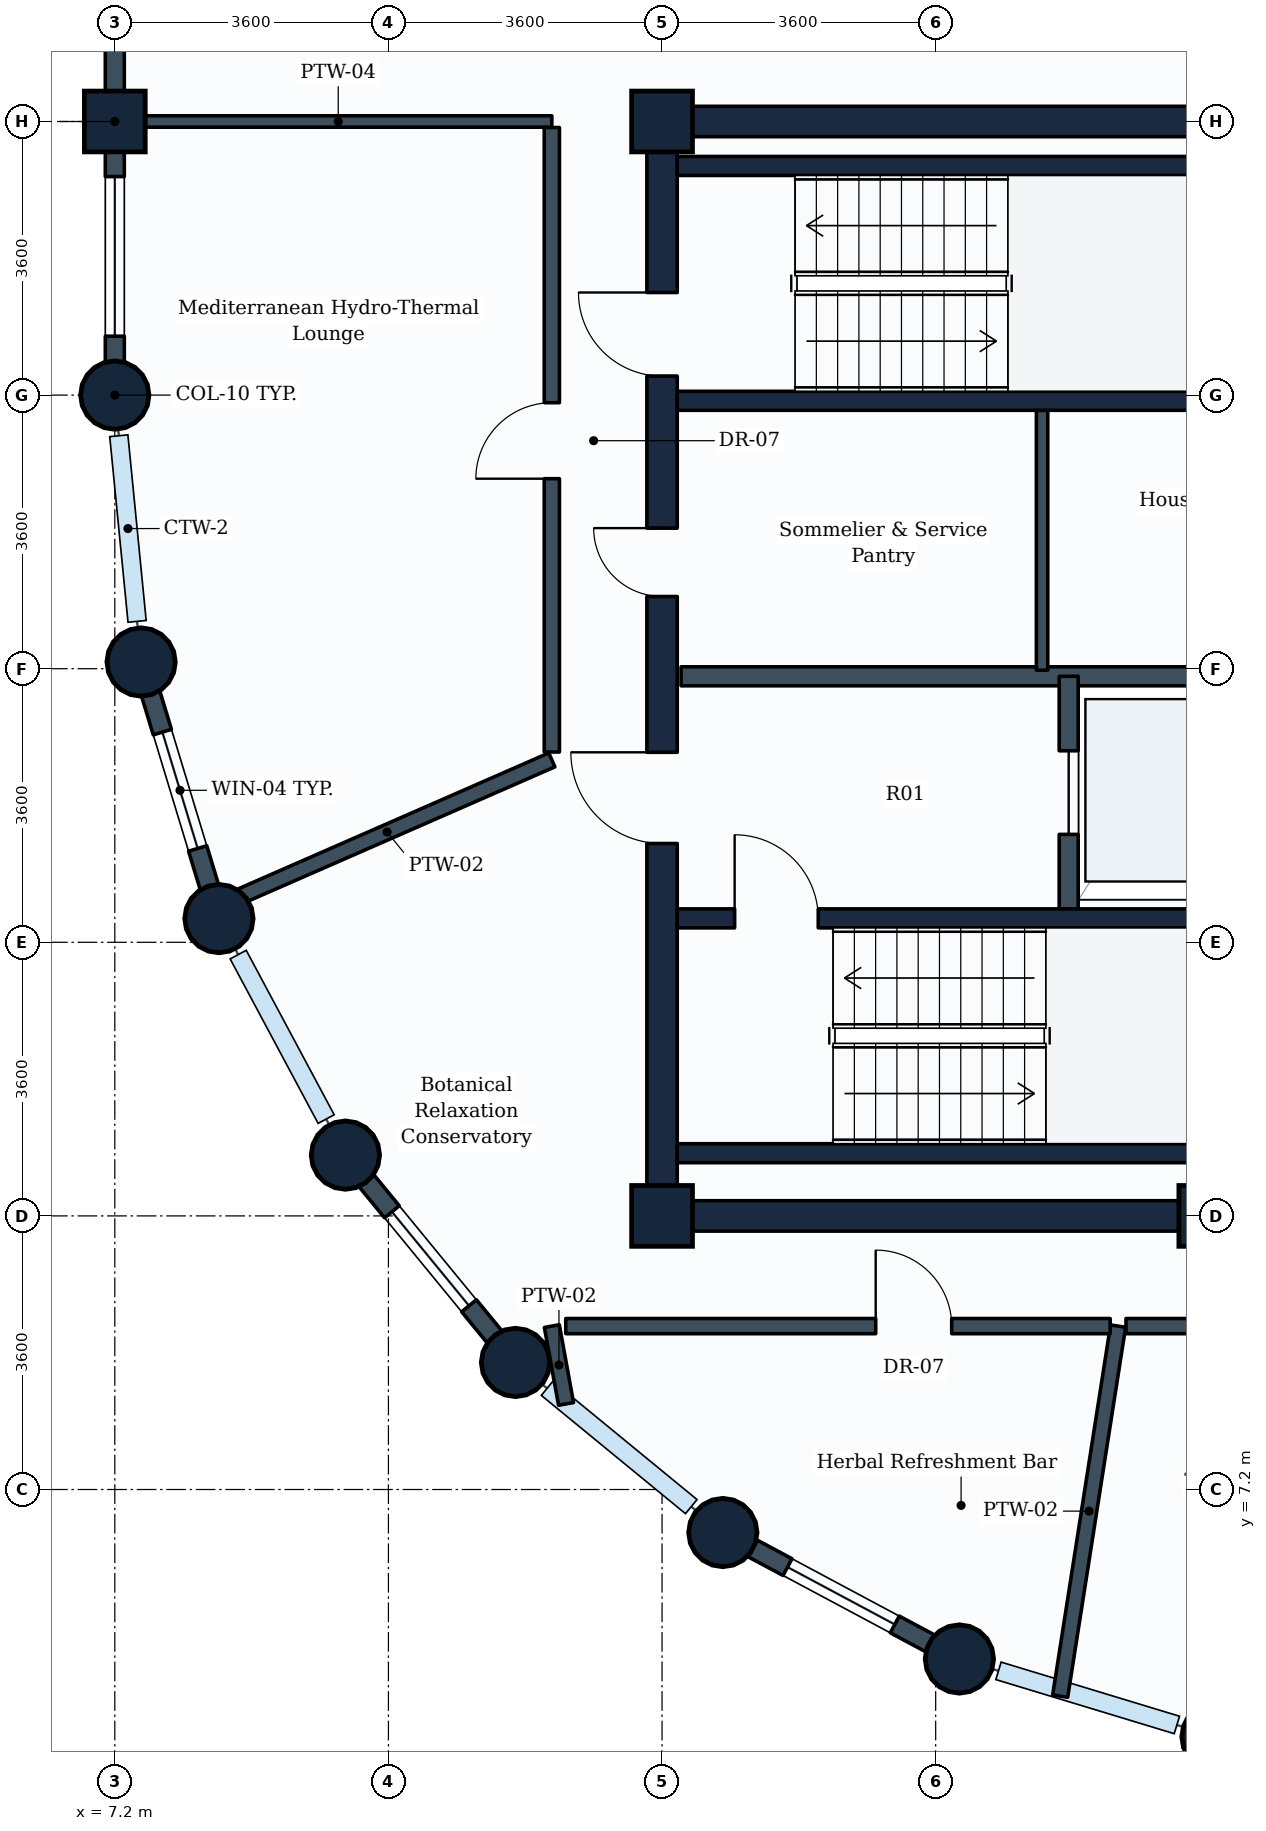
"""IFC4 building model, lengths in metres.
Left out: names, types, materials, properties, quantities, classifications, styles, units other than length and angle.
Written with IfcOpenShell. Run it as: python <this file> out.ifc"""

import sys

from ifc_helpers import new_model, si_unit, direction, frame, frame_2d, origin, origin_2d, place, context, subcontext, project, spatial, rectangle, circle, extrude, element, fill, save


model = new_model("IFC4")
c1 = context("Model", 3, precision=1e-05, world=origin(), true_north=direction((0.0, 1.0)))
c2 = subcontext(c1, "Body", "Model", "MODEL_VIEW")
j1 = project(units=[si_unit("LENGTHUNIT", "METRE"), si_unit("PLANEANGLEUNIT", "RADIAN")], contexts=[c1])
p1 = place(None, origin())
s1 = spatial("IfcSite", under=j1, at=p1, CompositionType="ELEMENT")
p2 = place(p1, origin())
s2 = spatial("IfcBuilding", under=s1, at=p2, CompositionType="ELEMENT")
p3 = place(p2, frame((0.0, 0.0, 239.0)))
s3 = spatial("IfcBuildingStorey", under=s2, at=p3, CompositionType="ELEMENT", Elevation=239.0)
p4 = place(p3, frame((7.2, 21.6, 0.0), z_axis=(0.0, 0.0, 1.0), x_axis=(1.0, 0.0, 0.0)))
e1 = element("IfcColumn", 1, at=p4, inside=s3, PredefinedType="COLUMN", context=c2, shape_type="SweptSolid", body=[
    extrude(circle(Radius=0.45, at=origin_2d()), origin(), (0.0, 0.0, 1.0), 3.6),
])
p5 = place(p3, frame((7.2, 25.2, 0.0), z_axis=(0.0, 0.0, 1.0), x_axis=(0.0, 1.0, 0.0)))
e2 = element("IfcColumn", 2, at=p5, inside=s3, PredefinedType="COLUMN", context=c2, shape_type="SweptSolid", body=[
    extrude(rectangle(XDim=0.8, YDim=0.8, at=origin_2d()), origin(), (0.0, 0.0, 1.0), 3.6),
])
for number, where, z_axis, x_axis in (
    (3, (7.546, 18.088, 0.0), (0.0, 0.0, 1.0), (1.0, 0.0, 0.0)),
    (4, (8.57, 14.712, 0.0), (0.0, 0.0, 1.0), (1.0, 0.0, 0.0)),
    (5, (10.234, 11.6, 0.0), (0.0, 0.0, 1.0), (1.0, 0.0, 0.0)),
    (6, (12.472, 8.872, 0.0), (0.0, 0.0, 1.0), (1.0, 0.0, 0.0)),
):
    element("IfcColumn", number, at=place(p3, frame(where, z_axis=z_axis, x_axis=x_axis)), inside=s3, PredefinedType="COLUMN", context=c2, shape_type="SweptSolid", body=[
        extrude(circle(Radius=0.45, at=origin_2d()), origin(), (0.0, 0.0, 1.0), 3.6),
    ])
for number, where, z_axis, x_axis in (
    (7, (14.4, 10.8, 0.0), (0.0, 0.0, 1.0), (1.0, 0.0, 0.0)),
    (8, (14.4, 25.2, 0.0), (0.0, 0.0, 1.0), (1.0, 0.0, 0.0)),
):
    element("IfcColumn", number, at=place(p3, frame(where, z_axis=z_axis, x_axis=x_axis)), inside=s3, PredefinedType="COLUMN", context=c2, shape_type="SweptSolid", body=[
        extrude(rectangle(XDim=0.8, YDim=0.8, at=origin_2d()), origin(), (0.0, 0.0, 1.0), 3.6),
    ])
for number, where, z_axis, x_axis in (
    (9, (15.2, 6.634, 0.0), (0.0, 0.0, 1.0), (1.0, 0.0, 0.0)),
    (10, (18.312, 4.97, 0.0), (0.0, 0.0, 1.0), (1.0, 0.0, 0.0)),
):
    element("IfcColumn", number, at=place(p3, frame(where, z_axis=z_axis, x_axis=x_axis)), inside=s3, PredefinedType="COLUMN", context=c2, shape_type="SweptSolid", body=[
        extrude(circle(Radius=0.45, at=origin_2d()), origin(), (0.0, 0.0, 1.0), 3.6),
    ])
p6 = place(p3, frame((21.6, 10.8, 0.0), z_axis=(0.0, 0.0, 1.0), x_axis=(1.0, 0.0, 0.0)))
e11 = element("IfcColumn", 11, at=p6, inside=s3, PredefinedType="COLUMN", context=c2, shape_type="SweptSolid", body=[
    extrude(rectangle(XDim=0.8, YDim=0.8, at=origin_2d()), origin(), (0.0, 0.0, 1.0), 3.6),
])
p7 = place(p3, frame((21.688, 3.946, 0.0), z_axis=(0.0, 0.0, 1.0), x_axis=(1.0, 0.0, 0.0)))
e12 = element("IfcColumn", 12, at=p7, inside=s3, PredefinedType="COLUMN", context=c2, shape_type="SweptSolid", body=[
    extrude(circle(Radius=0.45, at=origin_2d()), origin(), (0.0, 0.0, 1.0), 3.6),
])
p8 = place(p3, frame((7.2, 25.2, 0.0), z_axis=(0.0, 0.0, 1.0), x_axis=(0.0, 1.0, 0.0)))
e13 = element("IfcWall", 13, at=p8, inside=s3, PredefinedType="STANDARD", context=c2, shape_type="SweptSolid", body=[
    extrude(rectangle(XDim=3.6, YDim=0.25, at=frame_2d((1.8, 0.0))), origin(), (0.0, 0.0, 1.0), 2.83),
])
p9 = place(p3, frame((7.2, 21.6, 0.0), z_axis=(0.0, 0.0, 1.0), x_axis=(0.0, 1.0, 0.0)))
e14 = element("IfcWall", 14, at=p9, inside=s3, PredefinedType="STANDARD", context=c2, shape_type="SweptSolid", body=[
    extrude(rectangle(XDim=3.6, YDim=0.25, at=frame_2d((1.8, 0.0))), origin(), (0.0, 0.0, 1.0), 2.83),
])
p10 = place(p9, frame((0.775, 0.0, 0.85)))
e15 = element("IfcOpeningElement", 15, at=p10, cuts=e14, PredefinedType="OPENING", context=c2, shape_type="SweptSolid", body=[
    extrude(rectangle(XDim=2.1, YDim=1.35, at=frame_2d((1.05, 0.675))), frame((0.0, 0.135, 0.0), z_axis=(0.0, -1.0, 0.0), x_axis=(1.0, 0.0, 0.0)), (0.0, 0.0, 1.0), 0.27),
])
p11 = place(p3, frame((8.57, 14.712, 0.0), z_axis=(0.0, 0.0, 1.0), x_axis=(-0.290305086481, 0.956934144423, 0.0)))
e16 = element("IfcWall", 16, at=p11, inside=s3, PredefinedType="STANDARD", context=c2, shape_type="SweptSolid", body=[
    extrude(rectangle(XDim=3.528, YDim=0.25, at=frame_2d((1.764, 0.0))), origin(), (0.0, 0.0, 1.0), 2.83),
])
p12 = place(p11, frame((0.964, 0.0, 0.85)))
e17 = element("IfcOpeningElement", 17, at=p12, cuts=e16, PredefinedType="OPENING", context=c2, shape_type="SweptSolid", body=[
    extrude(rectangle(XDim=1.6, YDim=1.35, at=frame_2d((0.8, 0.675))), frame((0.0, 0.135, 0.0), z_axis=(0.0, -1.0, 0.0), x_axis=(1.0, 0.0, 0.0)), (0.0, 0.0, 1.0), 0.27),
])
p13 = place(p3, frame((12.472, 8.872, 0.0), z_axis=(0.0, 0.0, 1.0), x_axis=(-0.634258295121, 0.773121216285, 0.0)))
e18 = element("IfcWall", 18, at=p13, inside=s3, PredefinedType="STANDARD", context=c2, shape_type="SweptSolid", body=[
    extrude(rectangle(XDim=3.529, YDim=0.25, at=frame_2d((1.764, 0.0))), origin(), (0.0, 0.0, 1.0), 2.83),
])
p14 = place(p13, frame((0.964, 0.0, 0.85)))
e19 = element("IfcOpeningElement", 19, at=p14, cuts=e18, PredefinedType="OPENING", context=c2, shape_type="SweptSolid", body=[
    extrude(rectangle(XDim=1.6, YDim=1.35, at=frame_2d((0.8, 0.675))), frame((0.0, 0.135, 0.0), z_axis=(0.0, -1.0, 0.0), x_axis=(1.0, 0.0, 0.0)), (0.0, 0.0, 1.0), 0.27),
])
p15 = place(p3, frame((18.312, 4.97, 0.0), z_axis=(0.0, 0.0, 1.0), x_axis=(-0.881846862014, 0.471535907389, 0.0)))
e20 = element("IfcWall", 20, at=p15, inside=s3, PredefinedType="STANDARD", context=c2, shape_type="SweptSolid", body=[
    extrude(rectangle(XDim=3.529, YDim=0.25, at=frame_2d((1.765, 0.0))), origin(), (0.0, 0.0, 1.0), 2.83),
])
p16 = place(p15, frame((0.964, 0.0, 0.85)))
e21 = element("IfcOpeningElement", 21, at=p16, cuts=e20, PredefinedType="OPENING", context=c2, shape_type="SweptSolid", body=[
    extrude(rectangle(XDim=1.6, YDim=1.35, at=frame_2d((0.8, 0.675))), frame((0.0, 0.135, 0.0), z_axis=(0.0, -1.0, 0.0), x_axis=(1.0, 0.0, 0.0)), (0.0, 0.0, 1.0), 0.27),
])
p17 = place(p3, frame((14.4, 10.8, 0.0), z_axis=(0.0, 0.0, 1.0), x_axis=(1.0, 0.0, 0.0)))
e22 = element("IfcWall", 22, at=p17, inside=s3, PredefinedType="SHEAR", context=c2, shape_type="SweptSolid", body=[
    extrude(rectangle(XDim=18.0, YDim=0.4, at=frame_2d((9.0, 0.0))), origin(), (0.0, 0.0, 1.0), 3.35),
])
p18 = place(p3, frame((14.4, 25.2, 0.0), z_axis=(0.0, 0.0, 1.0), x_axis=(1.0, 0.0, 0.0)))
e23 = element("IfcWall", 23, at=p18, inside=s3, PredefinedType="SHEAR", context=c2, shape_type="SweptSolid", body=[
    extrude(rectangle(XDim=10.8, YDim=0.4, at=frame_2d((5.4, 0.0))), origin(), (0.0, 0.0, 1.0), 3.35),
])
p19 = place(p3, frame((14.4, 10.8, 0.0), z_axis=(0.0, 0.0, 1.0), x_axis=(0.0, 1.0, 0.0)))
e24 = element("IfcWall", 24, at=p19, inside=s3, PredefinedType="SHEAR", context=c2, shape_type="SweptSolid", body=[
    extrude(rectangle(XDim=14.4, YDim=0.4, at=frame_2d((7.2, 0.0))), origin(), (0.0, 0.0, 1.0), 3.35),
])
p20 = place(p19, frame((11.05, 0.0, 0.0)))
e25 = element("IfcOpeningElement", 25, at=p20, cuts=e24, PredefinedType="OPENING", context=c2, shape_type="SweptSolid", body=[
    extrude(rectangle(XDim=1.1, YDim=2.1, at=frame_2d((0.55, 1.05))), frame((0.0, 0.21, 0.0), z_axis=(0.0, -1.0, 0.0), x_axis=(1.0, 0.0, 0.0)), (0.0, 0.0, 1.0), 0.42),
])
p21 = place(p19, frame((4.9, 0.0, 0.0)))
e26 = element("IfcOpeningElement", 26, at=p21, cuts=e24, PredefinedType="OPENING", context=c2, shape_type="SweptSolid", body=[
    extrude(rectangle(XDim=1.2, YDim=2.1, at=frame_2d((0.6, 1.05))), frame((0.0, 0.21, 0.0), z_axis=(0.0, -1.0, 0.0), x_axis=(1.0, 0.0, 0.0)), (0.0, 0.0, 1.0), 0.42),
])
p22 = place(p19, frame((8.15, 0.0, 0.0)))
e27 = element("IfcOpeningElement", 27, at=p22, cuts=e24, PredefinedType="OPENING", context=c2, shape_type="SweptSolid", body=[
    extrude(rectangle(XDim=0.9, YDim=2.1, at=frame_2d((0.45, 1.05))), frame((0.0, 0.21, 0.0), z_axis=(0.0, -1.0, 0.0), x_axis=(1.0, 0.0, 0.0)), (0.0, 0.0, 1.0), 0.42),
])
p23 = place(p3, frame((14.6, 11.625, 0.0), z_axis=(0.0, 0.0, 1.0), x_axis=(1.0, 0.0, 0.0)))
e28 = element("IfcWall", 28, at=p23, inside=s3, PredefinedType="SHEAR", context=c2, shape_type="SweptSolid", body=[
    extrude(rectangle(XDim=8.75, YDim=0.25, at=frame_2d((4.375, 0.0))), origin(), (0.0, 0.0, 1.0), 3.35),
])
p24 = place(p3, frame((14.6, 14.715, 0.0), z_axis=(0.0, 0.0, 1.0), x_axis=(1.0, 0.0, 0.0)))
e29 = element("IfcWall", 29, at=p24, inside=s3, PredefinedType="SHEAR", context=c2, shape_type="SweptSolid", body=[
    extrude(rectangle(XDim=8.75, YDim=0.25, at=frame_2d((4.375, 0.0))), origin(), (0.0, 0.0, 1.0), 3.35),
])
p25 = place(p24, frame((0.755, 0.0, 0.0)))
e30 = element("IfcOpeningElement", 30, at=p25, cuts=e29, PredefinedType="OPENING", context=c2, shape_type="SweptSolid", body=[
    extrude(rectangle(XDim=1.1, YDim=2.1, at=frame_2d((0.55, 1.05))), frame((0.0, 0.135, 0.0), z_axis=(0.0, -1.0, 0.0), x_axis=(1.0, 0.0, 0.0)), (0.0, 0.0, 1.0), 0.27),
])
for number, where, z_axis, x_axis in (
    (31, (14.6, 21.525, 0.0), (0.0, 0.0, 1.0), (1.0, 0.0, 0.0)),
    (32, (14.6, 24.615, 0.0), (0.0, 0.0, 1.0), (1.0, 0.0, 0.0)),
):
    element("IfcWall", number, at=place(p3, frame(where, z_axis=z_axis, x_axis=x_axis)), inside=s3, PredefinedType="SHEAR", context=c2, shape_type="SweptSolid", body=[
        extrude(rectangle(XDim=8.3, YDim=0.25, at=frame_2d((4.15, 0.0))), origin(), (0.0, 0.0, 1.0), 3.35),
    ])
p26 = place(p3, frame((14.65, 17.9, 0.0), z_axis=(0.0, 0.0, 1.0), x_axis=(1.0, 0.0, 0.0)))
e33 = element("IfcWall", 33, at=p26, inside=s3, PredefinedType="PARTITIONING", context=c2, shape_type="SweptSolid", body=[
    extrude(rectangle(XDim=7.15, YDim=0.25, at=frame_2d((3.575, 0.0))), origin(), (0.0, 0.0, 1.0), 3.335),
])
p27 = place(p3, frame((19.75, 14.84, 0.0), z_axis=(0.0, 0.0, 1.0), x_axis=(0.0, 1.0, 0.0)))
e34 = element("IfcWall", 34, at=p27, inside=s3, PredefinedType="PARTITIONING", context=c2, shape_type="SweptSolid", body=[
    extrude(rectangle(XDim=3.06, YDim=0.25, at=frame_2d((1.53, 0.0))), origin(), (0.0, 0.0, 1.0), 3.335),
])
p28 = place(p27, frame((0.98, 0.0, 0.0)))
e35 = element("IfcOpeningElement", 35, at=p28, cuts=e34, PredefinedType="OPENING", context=c2, shape_type="SweptSolid", body=[
    extrude(rectangle(XDim=1.1, YDim=2.1, at=frame_2d((0.55, 1.05))), frame((0.0, 0.135, 0.0), z_axis=(0.0, -1.0, 0.0), x_axis=(1.0, 0.0, 0.0)), (0.0, 0.0, 1.0), 0.27),
])
p29 = place(p3, frame((19.4, 17.98, 0.0), z_axis=(0.0, 0.0, 1.0), x_axis=(0.0, 1.0, 0.0)))
e36 = element("IfcWall", 36, at=p29, inside=s3, PredefinedType="PARTITIONING", context=c2, shape_type="SweptSolid", body=[
    extrude(rectangle(XDim=3.42, YDim=0.15, at=frame_2d((1.71, 0.0))), origin(), (0.0, 0.0, 1.0), 3.335),
])
p30 = place(p3, frame((7.329, 25.2, 0.0), z_axis=(0.0, 0.0, 1.0), x_axis=(1.0, 0.0, 0.0)))
e37 = element("IfcWall", 37, at=p30, inside=s3, PredefinedType="PARTITIONING", context=c2, shape_type="SweptSolid", body=[
    extrude(rectangle(XDim=5.621, YDim=0.15, at=frame_2d((2.811, 0.0))), origin(), (0.0, 0.0, 1.0), 3.335),
])
p31 = place(p3, frame((12.95, 16.8, 0.0), z_axis=(0.0, 0.0, 1.0), x_axis=(-0.916090997314, -0.400970428635, 0.0)))
e38 = element("IfcWall", 38, at=p31, inside=s3, PredefinedType="PARTITIONING", context=c2, shape_type="SweptSolid", body=[
    extrude(rectangle(XDim=4.731, YDim=0.2, at=frame_2d((2.365, 0.0))), origin(), (0.0, 0.0, 1.0), 2.83),
])
p32 = place(p3, frame((12.95, 9.35, 0.0), z_axis=(0.0, 0.0, 1.0), x_axis=(0.179628288534, -0.983734556656, 0.0)))
e39 = element("IfcWall", 39, at=p32, inside=s3, PredefinedType="PARTITIONING", context=c2, shape_type="SweptSolid", body=[
    extrude(rectangle(XDim=1.041, YDim=0.2, at=frame_2d((0.521, 0.0))), origin(), (0.0, 0.0, 1.0), 2.83),
])
p33 = place(p3, frame((20.4, 9.35, 0.0), z_axis=(0.0, 0.0, 1.0), x_axis=(-0.154606571481, -0.987976117148, 0.0)))
e40 = element("IfcWall", 40, at=p33, inside=s3, PredefinedType="PARTITIONING", context=c2, shape_type="SweptSolid", body=[
    extrude(rectangle(XDim=4.928, YDim=0.2, at=frame_2d((2.464, 0.0))), origin(), (0.0, 0.0, 1.0), 2.83),
])
p34 = place(p3, frame((12.95, 16.904, 0.0), z_axis=(0.0, 0.0, 1.0), x_axis=(0.0, 1.0, 0.0)))
e41 = element("IfcWall", 41, at=p34, inside=s3, PredefinedType="PARTITIONING", context=c2, shape_type="SweptSolid", body=[
    extrude(rectangle(XDim=8.217, YDim=0.2, at=frame_2d((4.108, 0.0))), origin(), (0.0, 0.0, 1.0), 3.02),
])
p35 = place(p34, frame((3.596, 0.0, 0.0)))
e42 = element("IfcOpeningElement", 42, at=p35, cuts=e41, PredefinedType="OPENING", context=c2, shape_type="SweptSolid", body=[
    extrude(rectangle(XDim=1.0, YDim=2.1, at=frame_2d((0.5, 1.05))), frame((0.0, 0.11, 0.0), z_axis=(0.0, -1.0, 0.0), x_axis=(1.0, 0.0, 0.0)), (0.0, 0.0, 1.0), 0.22),
])
p36 = place(p3, frame((13.133, 9.35, 0.0), z_axis=(0.0, 0.0, 1.0), x_axis=(1.0, 0.0, 0.0)))
e43 = element("IfcWall", 43, at=p36, inside=s3, PredefinedType="PARTITIONING", context=c2, shape_type="SweptSolid", body=[
    extrude(rectangle(XDim=7.163, YDim=0.2, at=frame_2d((3.582, 0.0))), origin(), (0.0, 0.0, 1.0), 3.02),
])
p37 = place(p36, frame((4.078, 0.0, 0.0)))
e44 = element("IfcOpeningElement", 44, at=p37, cuts=e43, PredefinedType="OPENING", context=c2, shape_type="SweptSolid", body=[
    extrude(rectangle(XDim=1.0, YDim=2.1, at=frame_2d((0.5, 1.05))), frame((0.0, 0.11, 0.0), z_axis=(0.0, -1.0, 0.0), x_axis=(1.0, 0.0, 0.0)), (0.0, 0.0, 1.0), 0.22),
])
p38 = place(p3, frame((20.504, 9.35, 0.0), z_axis=(0.0, 0.0, 1.0), x_axis=(1.0, 0.0, 0.0)))
e45 = element("IfcWall", 45, at=p38, inside=s3, PredefinedType="PARTITIONING", context=c2, shape_type="SweptSolid", body=[
    extrude(rectangle(XDim=8.217, YDim=0.2, at=frame_2d((4.108, 0.0))), origin(), (0.0, 0.0, 1.0), 3.02),
])
p39 = place(p38, frame((3.914, 0.0, 0.0)))
e46 = element("IfcOpeningElement", 46, at=p39, cuts=e45, PredefinedType="OPENING", context=c2, shape_type="SweptSolid", body=[
    extrude(rectangle(XDim=1.0, YDim=2.1, at=frame_2d((0.5, 1.05))), frame((0.0, 0.11, 0.0), z_axis=(0.0, -1.0, 0.0), x_axis=(1.0, 0.0, 0.0)), (0.0, 0.0, 1.0), 0.22),
])
p40 = place(p10, origin())
e47 = element("IfcWindow", 47, at=p40, inside=s3, PartitioningType="SINGLE_PANEL", PredefinedType="WINDOW", context=c2, shape_type="SweptSolid", body=[
    extrude(rectangle(XDim=2.1, YDim=1.35, at=frame_2d((1.05, 0.675))), frame((0.0, 0.03, 0.0), z_axis=(0.0, -1.0, 0.0), x_axis=(1.0, 0.0, 0.0)), (0.0, 0.0, 1.0), 0.06),
])
fill(e15, e47)
p41 = place(p12, origin())
e48 = element("IfcWindow", 48, at=p41, inside=s3, PartitioningType="SINGLE_PANEL", PredefinedType="WINDOW", context=c2, shape_type="SweptSolid", body=[
    extrude(rectangle(XDim=1.6, YDim=1.35, at=frame_2d((0.8, 0.675))), frame((0.0, 0.03, 0.0), z_axis=(0.0, -1.0, 0.0), x_axis=(1.0, 0.0, 0.0)), (0.0, 0.0, 1.0), 0.06),
])
fill(e17, e48)
p42 = place(p14, origin())
e49 = element("IfcWindow", 49, at=p42, inside=s3, PartitioningType="SINGLE_PANEL", PredefinedType="WINDOW", context=c2, shape_type="SweptSolid", body=[
    extrude(rectangle(XDim=1.6, YDim=1.35, at=frame_2d((0.8, 0.675))), frame((0.0, 0.03, 0.0), z_axis=(0.0, -1.0, 0.0), x_axis=(1.0, 0.0, 0.0)), (0.0, 0.0, 1.0), 0.06),
])
fill(e19, e49)
p43 = place(p16, origin())
e50 = element("IfcWindow", 50, at=p43, inside=s3, PartitioningType="SINGLE_PANEL", PredefinedType="WINDOW", context=c2, shape_type="SweptSolid", body=[
    extrude(rectangle(XDim=1.6, YDim=1.35, at=frame_2d((0.8, 0.675))), frame((0.0, 0.03, 0.0), z_axis=(0.0, -1.0, 0.0), x_axis=(1.0, 0.0, 0.0)), (0.0, 0.0, 1.0), 0.06),
])
fill(e21, e50)
p44 = place(p25, origin())
e51 = element("IfcDoor", 51, at=p44, inside=s3, OperationType="SINGLE_SWING_LEFT", PredefinedType="DOOR", context=c2, shape_type="SweptSolid", body=[
    extrude(rectangle(XDim=1.1, YDim=2.1, at=frame_2d((0.55, 1.05))), frame((0.0, 0.025, 0.0), z_axis=(0.0, -1.0, 0.0), x_axis=(1.0, 0.0, 0.0)), (0.0, 0.0, 1.0), 0.05),
])
fill(e30, e51)
p45 = place(p20, origin())
e52 = element("IfcDoor", 52, at=p45, inside=s3, OperationType="SINGLE_SWING_RIGHT", PredefinedType="DOOR", context=c2, shape_type="SweptSolid", body=[
    extrude(rectangle(XDim=1.1, YDim=2.1, at=frame_2d((0.55, 1.05))), frame((0.0, 0.025, 0.0), z_axis=(0.0, -1.0, 0.0), x_axis=(1.0, 0.0, 0.0)), (0.0, 0.0, 1.0), 0.05),
])
fill(e25, e52)
p46 = place(p28, origin())
e53 = element("IfcDoor", 53, at=p46, inside=s3, OperationType="SLIDING_TO_LEFT", PredefinedType="DOOR", context=c2, shape_type="SweptSolid", body=[
    extrude(rectangle(XDim=1.1, YDim=2.1, at=frame_2d((0.55, 1.05))), frame((0.0, 0.025, 0.0), z_axis=(0.0, -1.0, 0.0), x_axis=(1.0, 0.0, 0.0)), (0.0, 0.0, 1.0), 0.05),
])
fill(e35, e53)
p47 = place(p21, origin())
e54 = element("IfcDoor", 54, at=p47, inside=s3, OperationType="SINGLE_SWING_RIGHT", PredefinedType="DOOR", context=c2, shape_type="SweptSolid", body=[
    extrude(rectangle(XDim=1.2, YDim=2.1, at=frame_2d((0.6, 1.05))), frame((0.0, 0.025, 0.0), z_axis=(0.0, -1.0, 0.0), x_axis=(1.0, 0.0, 0.0)), (0.0, 0.0, 1.0), 0.05),
])
fill(e26, e54)
p48 = place(p22, origin())
e55 = element("IfcDoor", 55, at=p48, inside=s3, OperationType="SINGLE_SWING_RIGHT", PredefinedType="DOOR", context=c2, shape_type="SweptSolid", body=[
    extrude(rectangle(XDim=0.9, YDim=2.1, at=frame_2d((0.45, 1.05))), frame((0.0, 0.025, 0.0), z_axis=(0.0, -1.0, 0.0), x_axis=(1.0, 0.0, 0.0)), (0.0, 0.0, 1.0), 0.05),
])
fill(e27, e55)
p49 = place(p35, origin())
e56 = element("IfcDoor", 56, at=p49, inside=s3, OperationType="SINGLE_SWING_LEFT", PredefinedType="DOOR", context=c2, shape_type="SweptSolid", body=[
    extrude(rectangle(XDim=1.0, YDim=2.1, at=frame_2d((0.5, 1.05))), frame((0.0, 0.025, 0.0), z_axis=(0.0, -1.0, 0.0), x_axis=(1.0, 0.0, 0.0)), (0.0, 0.0, 1.0), 0.05),
])
fill(e42, e56)
p50 = place(p37, origin())
e57 = element("IfcDoor", 57, at=p50, inside=s3, OperationType="SINGLE_SWING_LEFT", PredefinedType="DOOR", context=c2, shape_type="SweptSolid", body=[
    extrude(rectangle(XDim=1.0, YDim=2.1, at=frame_2d((0.5, 1.05))), frame((0.0, 0.025, 0.0), z_axis=(0.0, -1.0, 0.0), x_axis=(1.0, 0.0, 0.0)), (0.0, 0.0, 1.0), 0.05),
])
fill(e44, e57)
save(model, sys.argv[1])
